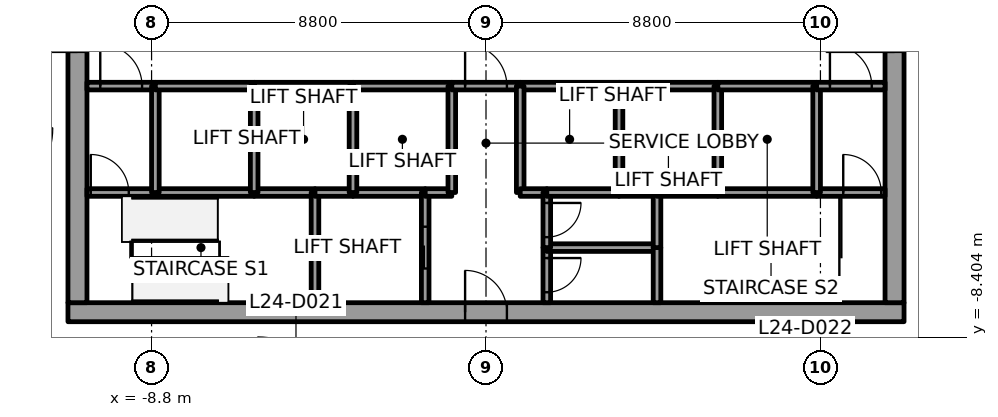
"""IFC4 building model, lengths in metres.
Left out: names, types, materials, properties, quantities, classifications, styles, units other than length and angle.
Written with IfcOpenShell. Run it as: python <this file> out.ifc"""

import sys

from ifc_helpers import new_model, si_unit, direction, frame, frame_2d, origin, place, context, subcontext, project, spatial, rectangle, extrude, element, fill, save


model = new_model("IFC4")
c1 = context("Model", 3, precision=1e-05, world=origin(), true_north=direction((0.0, 1.0)))
c2 = subcontext(c1, "Body", "Model", "MODEL_VIEW")
j1 = project(units=[si_unit("LENGTHUNIT", "METRE"), si_unit("PLANEANGLEUNIT", "RADIAN")], contexts=[c1])
p1 = place(None, origin())
s1 = spatial("IfcSite", under=j1, at=p1, CompositionType="ELEMENT")
p2 = place(p1, origin())
s2 = spatial("IfcBuilding", under=s1, at=p2, CompositionType="ELEMENT")
p3 = place(p2, frame((0.0, 0.0, 112.6)))
s3 = spatial("IfcBuildingStorey", under=s2, at=p3, CompositionType="ELEMENT", Elevation=112.6)
p4 = place(p3, frame((-11.0, -7.75, 0.0), z_axis=(0.0, 0.0, 1.0), x_axis=(1.0, 0.0, 0.0)))
e1 = element("IfcWall", 1, at=p4, inside=s3, PredefinedType="SHEAR", context=c2, shape_type="SweptSolid", body=[
    extrude(rectangle(XDim=22.0, YDim=0.5, at=frame_2d((11.0, 0.0))), origin(), (0.0, 0.0, 1.0), 6.0),
])
p5 = place(p4, frame((10.45, 0.0, 0.0)))
e2 = element("IfcOpeningElement", 2, at=p5, cuts=e1, PredefinedType="OPENING", context=c2, shape_type="SweptSolid", body=[
    extrude(rectangle(XDim=1.1, YDim=2.1, at=frame_2d((0.55, 1.05))), frame((0.0, 0.25, 0.0), z_axis=(0.0, -1.0, 0.0), x_axis=(1.0, 0.0, 0.0)), (0.0, 0.0, 1.0), 0.5),
])
p6 = place(p3, frame((-10.75, -7.5, 0.0), z_axis=(0.0, 0.0, 1.0), x_axis=(0.0, 1.0, 0.0)))
e3 = element("IfcWall", 3, at=p6, inside=s3, PredefinedType="SHEAR", context=c2, shape_type="SweptSolid", body=[
    extrude(rectangle(XDim=15.0, YDim=0.5, at=frame_2d((7.5, 0.0))), origin(), (0.0, 0.0, 1.0), 6.0),
])
p7 = place(p6, frame((6.6, 0.0, 0.0)))
e4 = element("IfcOpeningElement", 4, at=p7, cuts=e3, PredefinedType="OPENING", context=c2, shape_type="SweptSolid", body=[
    extrude(rectangle(XDim=1.8, YDim=2.1, at=frame_2d((0.9, 1.05))), frame((0.0, 0.25, 0.0), z_axis=(0.0, -1.0, 0.0), x_axis=(1.0, 0.0, 0.0)), (0.0, 0.0, 1.0), 0.5),
])
p8 = place(p3, frame((10.75, -7.5, 0.0), z_axis=(0.0, 0.0, 1.0), x_axis=(0.0, 1.0, 0.0)))
e5 = element("IfcWall", 5, at=p8, inside=s3, PredefinedType="SHEAR", context=c2, shape_type="SweptSolid", body=[
    extrude(rectangle(XDim=15.0, YDim=0.5, at=frame_2d((7.5, 0.0))), origin(), (0.0, 0.0, 1.0), 6.0),
])
p9 = place(p8, frame((6.6, 0.0, 0.0)))
e6 = element("IfcOpeningElement", 6, at=p9, cuts=e5, PredefinedType="OPENING", context=c2, shape_type="SweptSolid", body=[
    extrude(rectangle(XDim=1.8, YDim=2.1, at=frame_2d((0.9, 1.05))), frame((0.0, 0.25, 0.0), z_axis=(0.0, -1.0, 0.0), x_axis=(1.0, 0.0, 0.0)), (0.0, 0.0, 1.0), 0.5),
])
p10 = place(p3, frame((-10.5, -4.6, 0.0), z_axis=(0.0, 0.0, 1.0), x_axis=(1.0, 0.0, 0.0)))
e7 = element("IfcWall", 7, at=p10, inside=s3, PredefinedType="SOLIDWALL", context=c2, shape_type="SweptSolid", body=[
    extrude(rectangle(XDim=1.8, YDim=0.2, at=frame_2d((0.9, 0.0))), origin(), (0.0, 0.0, 1.0), 5.85),
])
p11 = place(p10, frame((0.1, 0.0, 0.0)))
e8 = element("IfcOpeningElement", 8, at=p11, cuts=e7, PredefinedType="OPENING", context=c2, shape_type="SweptSolid", body=[
    extrude(rectangle(XDim=1.0, YDim=2.1, at=frame_2d((0.5, 1.05))), frame((0.0, 0.1, 0.0), z_axis=(0.0, -1.0, 0.0), x_axis=(1.0, 0.0, 0.0)), (0.0, 0.0, 1.0), 0.2),
])
p12 = place(p3, frame((-10.5, -1.8, 0.0), z_axis=(0.0, 0.0, 1.0), x_axis=(1.0, 0.0, 0.0)))
e9 = element("IfcWall", 9, at=p12, inside=s3, PredefinedType="SOLIDWALL", context=c2, shape_type="SweptSolid", body=[
    extrude(rectangle(XDim=1.8, YDim=0.2, at=frame_2d((0.9, 0.0))), origin(), (0.0, 0.0, 1.0), 5.85),
])
p13 = place(p12, frame((0.35, 0.0, 0.0)))
e10 = element("IfcOpeningElement", 10, at=p13, cuts=e9, PredefinedType="OPENING", context=c2, shape_type="SweptSolid", body=[
    extrude(rectangle(XDim=1.1, YDim=2.1, at=frame_2d((0.55, 1.05))), frame((0.0, 0.1, 0.0), z_axis=(0.0, -1.0, 0.0), x_axis=(1.0, 0.0, 0.0)), (0.0, 0.0, 1.0), 0.2),
])
p14 = place(p3, frame((-8.7, -4.6, 0.0), z_axis=(0.0, 0.0, 1.0), x_axis=(1.0, 0.0, 0.0)))
e11 = element("IfcWall", 11, at=p14, inside=s3, PredefinedType="SOLIDWALL", context=c2, shape_type="SweptSolid", body=[
    extrude(rectangle(XDim=2.6, YDim=0.2, at=frame_2d((1.3, 0.0))), origin(), (0.0, 0.0, 1.0), 5.85),
])
p15 = place(p3, frame((-8.7, -4.6, 0.0), z_axis=(0.0, 0.0, 1.0), x_axis=(0.0, 1.0, 0.0)))
e12 = element("IfcWall", 12, at=p15, inside=s3, PredefinedType="SOLIDWALL", context=c2, shape_type="SweptSolid", body=[
    extrude(rectangle(XDim=2.8, YDim=0.2, at=frame_2d((1.4, 0.0))), origin(), (0.0, 0.0, 1.0), 5.85),
])
p16 = place(p3, frame((-8.7, -1.8, 0.0), z_axis=(0.0, 0.0, 1.0), x_axis=(1.0, 0.0, 0.0)))
e13 = element("IfcWall", 13, at=p16, inside=s3, PredefinedType="SOLIDWALL", context=c2, shape_type="SweptSolid", body=[
    extrude(rectangle(XDim=2.6, YDim=0.2, at=frame_2d((1.3, 0.0))), origin(), (0.0, 0.0, 1.0), 5.85),
])
p17 = place(p3, frame((-6.1, -4.6, 0.0), z_axis=(0.0, 0.0, 1.0), x_axis=(1.0, 0.0, 0.0)))
e14 = element("IfcWall", 14, at=p17, inside=s3, PredefinedType="SOLIDWALL", context=c2, shape_type="SweptSolid", body=[
    extrude(rectangle(XDim=1.6, YDim=0.2, at=frame_2d((0.8, 0.0))), origin(), (0.0, 0.0, 1.0), 5.85),
])
p18 = place(p3, frame((-6.1, -4.6, 0.0), z_axis=(0.0, 0.0, 1.0), x_axis=(0.0, 1.0, 0.0)))
e15 = element("IfcWall", 15, at=p18, inside=s3, PredefinedType="SOLIDWALL", context=c2, shape_type="SweptSolid", body=[
    extrude(rectangle(XDim=2.8, YDim=0.2, at=frame_2d((1.4, 0.0))), origin(), (0.0, 0.0, 1.0), 5.85),
])
p19 = place(p3, frame((-6.1, -1.8, 0.0), z_axis=(0.0, 0.0, 1.0), x_axis=(1.0, 0.0, 0.0)))
e16 = element("IfcWall", 16, at=p19, inside=s3, PredefinedType="SOLIDWALL", context=c2, shape_type="SweptSolid", body=[
    extrude(rectangle(XDim=2.6, YDim=0.2, at=frame_2d((1.3, 0.0))), origin(), (0.0, 0.0, 1.0), 5.85),
])
p20 = place(p3, frame((-4.5, -4.6, 0.0), z_axis=(0.0, 0.0, 1.0), x_axis=(0.0, -1.0, 0.0)))
e17 = element("IfcWall", 17, at=p20, inside=s3, PredefinedType="SOLIDWALL", context=c2, shape_type="SweptSolid", body=[
    extrude(rectangle(XDim=2.9, YDim=0.2, at=frame_2d((1.45, 0.0))), origin(), (0.0, 0.0, 1.0), 5.85),
])
p21 = place(p3, frame((-4.5, -4.6, 0.0), z_axis=(0.0, 0.0, 1.0), x_axis=(1.0, 0.0, 0.0)))
e18 = element("IfcWall", 18, at=p21, inside=s3, PredefinedType="SOLIDWALL", context=c2, shape_type="SweptSolid", body=[
    extrude(rectangle(XDim=1.0, YDim=0.2, at=frame_2d((0.5, 0.0))), origin(), (0.0, 0.0, 1.0), 5.85),
])
p22 = place(p3, frame((-3.5, -4.6, 0.0), z_axis=(0.0, 0.0, 1.0), x_axis=(1.0, 0.0, 0.0)))
e19 = element("IfcWall", 19, at=p22, inside=s3, PredefinedType="SOLIDWALL", context=c2, shape_type="SweptSolid", body=[
    extrude(rectangle(XDim=1.9, YDim=0.2, at=frame_2d((0.95, 0.0))), origin(), (0.0, 0.0, 1.0), 5.85),
])
p23 = place(p3, frame((-3.5, -4.6, 0.0), z_axis=(0.0, 0.0, 1.0), x_axis=(0.0, 1.0, 0.0)))
e20 = element("IfcWall", 20, at=p23, inside=s3, PredefinedType="SOLIDWALL", context=c2, shape_type="SweptSolid", body=[
    extrude(rectangle(XDim=2.8, YDim=0.2, at=frame_2d((1.4, 0.0))), origin(), (0.0, 0.0, 1.0), 5.85),
])
p24 = place(p3, frame((-3.5, -1.8, 0.0), z_axis=(0.0, 0.0, 1.0), x_axis=(1.0, 0.0, 0.0)))
e21 = element("IfcWall", 21, at=p24, inside=s3, PredefinedType="SOLIDWALL", context=c2, shape_type="SweptSolid", body=[
    extrude(rectangle(XDim=2.6, YDim=0.2, at=frame_2d((1.3, 0.0))), origin(), (0.0, 0.0, 1.0), 5.85),
])
p25 = place(p3, frame((-1.6, -7.5, 0.0), z_axis=(0.0, 0.0, 1.0), x_axis=(0.0, 1.0, 0.0)))
e22 = element("IfcWall", 22, at=p25, inside=s3, PredefinedType="SOLIDWALL", context=c2, shape_type="SweptSolid", body=[
    extrude(rectangle(XDim=2.9, YDim=0.2, at=frame_2d((1.45, 0.0))), origin(), (0.0, 0.0, 1.0), 5.85),
])
p26 = place(p25, frame((0.9, 0.0, 0.0)))
e23 = element("IfcOpeningElement", 23, at=p26, cuts=e22, PredefinedType="OPENING", context=c2, shape_type="SweptSolid", body=[
    extrude(rectangle(XDim=1.1, YDim=2.1, at=frame_2d((0.55, 1.05))), frame((0.0, 0.1, 0.0), z_axis=(0.0, -1.0, 0.0), x_axis=(1.0, 0.0, 0.0)), (0.0, 0.0, 1.0), 0.2),
])
p27 = place(p3, frame((-1.6, -4.6, 0.0), z_axis=(0.0, 0.0, 1.0), x_axis=(1.0, 0.0, 0.0)))
e24 = element("IfcWall", 24, at=p27, inside=s3, PredefinedType="SOLIDWALL", context=c2, shape_type="SweptSolid", body=[
    extrude(rectangle(XDim=0.7, YDim=0.2, at=frame_2d((0.35, 0.0))), origin(), (0.0, 0.0, 1.0), 5.85),
])
p28 = place(p3, frame((-0.9, -4.6, 0.0), z_axis=(0.0, 0.0, 1.0), x_axis=(0.0, 1.0, 0.0)))
e25 = element("IfcWall", 25, at=p28, inside=s3, PredefinedType="SOLIDWALL", context=c2, shape_type="SweptSolid", body=[
    extrude(rectangle(XDim=2.8, YDim=0.2, at=frame_2d((1.4, 0.0))), origin(), (0.0, 0.0, 1.0), 5.85),
])
p29 = place(p3, frame((-0.9, -1.8, 0.0), z_axis=(0.0, 0.0, 1.0), x_axis=(1.0, 0.0, 0.0)))
e26 = element("IfcWall", 26, at=p29, inside=s3, PredefinedType="SOLIDWALL", context=c2, shape_type="SweptSolid", body=[
    extrude(rectangle(XDim=1.8, YDim=0.2, at=frame_2d((0.9, 0.0))), origin(), (0.0, 0.0, 1.0), 5.85),
])
p30 = place(p29, frame((0.35, 0.0, 0.0)))
e27 = element("IfcOpeningElement", 27, at=p30, cuts=e26, PredefinedType="OPENING", context=c2, shape_type="SweptSolid", body=[
    extrude(rectangle(XDim=1.1, YDim=2.1, at=frame_2d((0.55, 1.05))), frame((0.0, 0.1, 0.0), z_axis=(0.0, -1.0, 0.0), x_axis=(1.0, 0.0, 0.0)), (0.0, 0.0, 1.0), 0.2),
])
p31 = place(p3, frame((0.9, -1.8, 0.0), z_axis=(0.0, 0.0, 1.0), x_axis=(1.0, 0.0, 0.0)))
e28 = element("IfcWall", 28, at=p31, inside=s3, PredefinedType="SOLIDWALL", context=c2, shape_type="SweptSolid", body=[
    extrude(rectangle(XDim=2.6, YDim=0.2, at=frame_2d((1.3, 0.0))), origin(), (0.0, 0.0, 1.0), 5.85),
])
p32 = place(p3, frame((0.9, -1.8, 0.0), z_axis=(0.0, 0.0, 1.0), x_axis=(0.0, -1.0, 0.0)))
e29 = element("IfcWall", 29, at=p32, inside=s3, PredefinedType="SOLIDWALL", context=c2, shape_type="SweptSolid", body=[
    extrude(rectangle(XDim=2.8, YDim=0.2, at=frame_2d((1.4, 0.0))), origin(), (0.0, 0.0, 1.0), 5.85),
])
p33 = place(p3, frame((0.9, -4.6, 0.0), z_axis=(0.0, 0.0, 1.0), x_axis=(1.0, 0.0, 0.0)))
e30 = element("IfcWall", 30, at=p33, inside=s3, PredefinedType="SOLIDWALL", context=c2, shape_type="SweptSolid", body=[
    extrude(rectangle(XDim=0.7, YDim=0.2, at=frame_2d((0.35, 0.0))), origin(), (0.0, 0.0, 1.0), 5.85),
])
p34 = place(p3, frame((1.6, -6.05, 0.0), z_axis=(0.0, 0.0, 1.0), x_axis=(0.0, -1.0, 0.0)))
e31 = element("IfcWall", 31, at=p34, inside=s3, PredefinedType="SOLIDWALL", context=c2, shape_type="SweptSolid", body=[
    extrude(rectangle(XDim=1.45, YDim=0.2, at=frame_2d((0.725, 0.0))), origin(), (0.0, 0.0, 1.0), 5.85),
])
p35 = place(p34, frame((0.275, 0.0, 0.0)))
e32 = element("IfcOpeningElement", 32, at=p35, cuts=e31, PredefinedType="OPENING", context=c2, shape_type="SweptSolid", body=[
    extrude(rectangle(XDim=0.9, YDim=2.1, at=frame_2d((0.45, 1.05))), frame((0.0, 0.1, 0.0), z_axis=(0.0, -1.0, 0.0), x_axis=(1.0, 0.0, 0.0)), (0.0, 0.0, 1.0), 0.2),
])
p36 = place(p3, frame((4.5, -6.05, 0.0), z_axis=(0.0, 0.0, 1.0), x_axis=(-1.0, 0.0, 0.0)))
e33 = element("IfcWall", 33, at=p36, inside=s3, PredefinedType="SOLIDWALL", context=c2, shape_type="SweptSolid", body=[
    extrude(rectangle(XDim=2.9, YDim=0.2, at=frame_2d((1.45, 0.0))), origin(), (0.0, 0.0, 1.0), 5.85),
])
p37 = place(p3, frame((1.6, -4.6, 0.0), z_axis=(0.0, 0.0, 1.0), x_axis=(0.0, -1.0, 0.0)))
e34 = element("IfcWall", 34, at=p37, inside=s3, PredefinedType="SOLIDWALL", context=c2, shape_type="SweptSolid", body=[
    extrude(rectangle(XDim=1.45, YDim=0.2, at=frame_2d((0.725, 0.0))), origin(), (0.0, 0.0, 1.0), 5.85),
])
p38 = place(p37, frame((0.275, 0.0, 0.0)))
e35 = element("IfcOpeningElement", 35, at=p38, cuts=e34, PredefinedType="OPENING", context=c2, shape_type="SweptSolid", body=[
    extrude(rectangle(XDim=0.9, YDim=2.1, at=frame_2d((0.45, 1.05))), frame((0.0, 0.1, 0.0), z_axis=(0.0, -1.0, 0.0), x_axis=(1.0, 0.0, 0.0)), (0.0, 0.0, 1.0), 0.2),
])
p39 = place(p3, frame((3.5, -4.6, 0.0), z_axis=(0.0, 0.0, 1.0), x_axis=(-1.0, 0.0, 0.0)))
e36 = element("IfcWall", 36, at=p39, inside=s3, PredefinedType="SOLIDWALL", context=c2, shape_type="SweptSolid", body=[
    extrude(rectangle(XDim=1.9, YDim=0.2, at=frame_2d((0.95, 0.0))), origin(), (0.0, 0.0, 1.0), 5.85),
])
p40 = place(p3, frame((4.5, -4.6, 0.0), z_axis=(0.0, 0.0, 1.0), x_axis=(-1.0, 0.0, 0.0)))
e37 = element("IfcWall", 37, at=p40, inside=s3, PredefinedType="SOLIDWALL", context=c2, shape_type="SweptSolid", body=[
    extrude(rectangle(XDim=1.0, YDim=0.2, at=frame_2d((0.5, 0.0))), origin(), (0.0, 0.0, 1.0), 5.85),
])
p41 = place(p3, frame((3.5, -4.6, 0.0), z_axis=(0.0, 0.0, 1.0), x_axis=(0.0, 1.0, 0.0)))
e38 = element("IfcWall", 38, at=p41, inside=s3, PredefinedType="SOLIDWALL", context=c2, shape_type="SweptSolid", body=[
    extrude(rectangle(XDim=2.8, YDim=0.2, at=frame_2d((1.4, 0.0))), origin(), (0.0, 0.0, 1.0), 5.85),
])
p42 = place(p3, frame((3.5, -1.8, 0.0), z_axis=(0.0, 0.0, 1.0), x_axis=(1.0, 0.0, 0.0)))
e39 = element("IfcWall", 39, at=p42, inside=s3, PredefinedType="SOLIDWALL", context=c2, shape_type="SweptSolid", body=[
    extrude(rectangle(XDim=2.6, YDim=0.2, at=frame_2d((1.3, 0.0))), origin(), (0.0, 0.0, 1.0), 5.85),
])
for number, where, z_axis, x_axis in (
    (40, (4.5, -7.5, 0.0), (0.0, 0.0, 1.0), (0.0, 1.0, 0.0)),
    (41, (4.5, -6.05, 0.0), (0.0, 0.0, 1.0), (0.0, 1.0, 0.0)),
):
    element("IfcWall", number, at=place(p3, frame(where, z_axis=z_axis, x_axis=x_axis)), inside=s3, PredefinedType="SOLIDWALL", context=c2, shape_type="SweptSolid", body=[
        extrude(rectangle(XDim=1.45, YDim=0.2, at=frame_2d((0.725, 0.0))), origin(), (0.0, 0.0, 1.0), 5.85),
    ])
p43 = place(p3, frame((4.5, -4.6, 0.0), z_axis=(0.0, 0.0, 1.0), x_axis=(1.0, 0.0, 0.0)))
e42 = element("IfcWall", 42, at=p43, inside=s3, PredefinedType="SOLIDWALL", context=c2, shape_type="SweptSolid", body=[
    extrude(rectangle(XDim=1.6, YDim=0.2, at=frame_2d((0.8, 0.0))), origin(), (0.0, 0.0, 1.0), 5.85),
])
p44 = place(p3, frame((6.1, -4.6, 0.0), z_axis=(0.0, 0.0, 1.0), x_axis=(1.0, 0.0, 0.0)))
e43 = element("IfcWall", 43, at=p44, inside=s3, PredefinedType="SOLIDWALL", context=c2, shape_type="SweptSolid", body=[
    extrude(rectangle(XDim=2.6, YDim=0.2, at=frame_2d((1.3, 0.0))), origin(), (0.0, 0.0, 1.0), 5.85),
])
p45 = place(p3, frame((6.1, -4.6, 0.0), z_axis=(0.0, 0.0, 1.0), x_axis=(0.0, 1.0, 0.0)))
e44 = element("IfcWall", 44, at=p45, inside=s3, PredefinedType="SOLIDWALL", context=c2, shape_type="SweptSolid", body=[
    extrude(rectangle(XDim=2.8, YDim=0.2, at=frame_2d((1.4, 0.0))), origin(), (0.0, 0.0, 1.0), 5.85),
])
p46 = place(p3, frame((6.1, -1.8, 0.0), z_axis=(0.0, 0.0, 1.0), x_axis=(1.0, 0.0, 0.0)))
e45 = element("IfcWall", 45, at=p46, inside=s3, PredefinedType="SOLIDWALL", context=c2, shape_type="SweptSolid", body=[
    extrude(rectangle(XDim=2.6, YDim=0.2, at=frame_2d((1.3, 0.0))), origin(), (0.0, 0.0, 1.0), 5.85),
])
p47 = place(p3, frame((8.7, -4.6, 0.0), z_axis=(0.0, 0.0, 1.0), x_axis=(1.0, 0.0, 0.0)))
e46 = element("IfcWall", 46, at=p47, inside=s3, PredefinedType="SOLIDWALL", context=c2, shape_type="SweptSolid", body=[
    extrude(rectangle(XDim=1.8, YDim=0.2, at=frame_2d((0.9, 0.0))), origin(), (0.0, 0.0, 1.0), 5.85),
])
p48 = place(p47, frame((0.7, 0.0, 0.0)))
e47 = element("IfcOpeningElement", 47, at=p48, cuts=e46, PredefinedType="OPENING", context=c2, shape_type="SweptSolid", body=[
    extrude(rectangle(XDim=1.0, YDim=2.1, at=frame_2d((0.5, 1.05))), frame((0.0, 0.1, 0.0), z_axis=(0.0, -1.0, 0.0), x_axis=(1.0, 0.0, 0.0)), (0.0, 0.0, 1.0), 0.2),
])
p49 = place(p3, frame((8.7, -1.8, 0.0), z_axis=(0.0, 0.0, 1.0), x_axis=(0.0, -1.0, 0.0)))
e48 = element("IfcWall", 48, at=p49, inside=s3, PredefinedType="SOLIDWALL", context=c2, shape_type="SweptSolid", body=[
    extrude(rectangle(XDim=2.8, YDim=0.2, at=frame_2d((1.4, 0.0))), origin(), (0.0, 0.0, 1.0), 5.85),
])
p50 = place(p3, frame((8.7, -1.8, 0.0), z_axis=(0.0, 0.0, 1.0), x_axis=(1.0, 0.0, 0.0)))
e49 = element("IfcWall", 49, at=p50, inside=s3, PredefinedType="SOLIDWALL", context=c2, shape_type="SweptSolid", body=[
    extrude(rectangle(XDim=1.8, YDim=0.2, at=frame_2d((0.9, 0.0))), origin(), (0.0, 0.0, 1.0), 5.85),
])
p51 = place(p50, frame((0.35, 0.0, 0.0)))
e50 = element("IfcOpeningElement", 50, at=p51, cuts=e49, PredefinedType="OPENING", context=c2, shape_type="SweptSolid", body=[
    extrude(rectangle(XDim=1.1, YDim=2.1, at=frame_2d((0.55, 1.05))), frame((0.0, 0.1, 0.0), z_axis=(0.0, -1.0, 0.0), x_axis=(1.0, 0.0, 0.0)), (0.0, 0.0, 1.0), 0.2),
])
p52 = place(p26, origin())
e51 = element("IfcDoor", 51, at=p52, inside=s3, OperationType="SLIDING_TO_LEFT", PredefinedType="DOOR", context=c2, shape_type="SweptSolid", body=[
    extrude(rectangle(XDim=1.1, YDim=2.1, at=frame_2d((0.55, 1.05))), frame((0.0, 0.025, 0.0), z_axis=(0.0, -1.0, 0.0), x_axis=(1.0, 0.0, 0.0)), (0.0, 0.0, 1.0), 0.05),
])
fill(e23, e51)
p53 = place(p13, origin())
e52 = element("IfcDoor", 52, at=p53, inside=s3, OperationType="SINGLE_SWING_RIGHT", PredefinedType="DOOR", context=c2, shape_type="SweptSolid", body=[
    extrude(rectangle(XDim=1.1, YDim=2.1, at=frame_2d((0.55, 1.05))), frame((0.0, 0.025, 0.0), z_axis=(0.0, -1.0, 0.0), x_axis=(1.0, 0.0, 0.0)), (0.0, 0.0, 1.0), 0.05),
])
fill(e10, e52)
p54 = place(p51, origin())
e53 = element("IfcDoor", 53, at=p54, inside=s3, OperationType="SINGLE_SWING_LEFT", PredefinedType="DOOR", context=c2, shape_type="SweptSolid", body=[
    extrude(rectangle(XDim=1.1, YDim=2.1, at=frame_2d((0.55, 1.05))), frame((0.0, 0.025, 0.0), z_axis=(0.0, -1.0, 0.0), x_axis=(1.0, 0.0, 0.0)), (0.0, 0.0, 1.0), 0.05),
])
fill(e50, e53)
p55 = place(p30, origin())
e54 = element("IfcDoor", 54, at=p55, inside=s3, OperationType="SINGLE_SWING_LEFT", PredefinedType="DOOR", context=c2, shape_type="SweptSolid", body=[
    extrude(rectangle(XDim=1.1, YDim=2.1, at=frame_2d((0.55, 1.05))), frame((0.0, 0.025, 0.0), z_axis=(0.0, -1.0, 0.0), x_axis=(1.0, 0.0, 0.0)), (0.0, 0.0, 1.0), 0.05),
])
fill(e27, e54)
p56 = place(p11, origin())
e55 = element("IfcDoor", 55, at=p56, inside=s3, OperationType="SINGLE_SWING_LEFT", PredefinedType="DOOR", context=c2, shape_type="SweptSolid", body=[
    extrude(rectangle(XDim=1.0, YDim=2.1, at=frame_2d((0.5, 1.05))), frame((0.0, 0.025, 0.0), z_axis=(0.0, -1.0, 0.0), x_axis=(1.0, 0.0, 0.0)), (0.0, 0.0, 1.0), 0.05),
])
fill(e8, e55)
p57 = place(p48, origin())
e56 = element("IfcDoor", 56, at=p57, inside=s3, OperationType="SINGLE_SWING_RIGHT", PredefinedType="DOOR", context=c2, shape_type="SweptSolid", body=[
    extrude(rectangle(XDim=1.0, YDim=2.1, at=frame_2d((0.5, 1.05))), frame((0.0, 0.025, 0.0), z_axis=(0.0, -1.0, 0.0), x_axis=(1.0, 0.0, 0.0)), (0.0, 0.0, 1.0), 0.05),
])
fill(e47, e56)
p58 = place(p35, origin())
e57 = element("IfcDoor", 57, at=p58, inside=s3, OperationType="SINGLE_SWING_LEFT", PredefinedType="DOOR", context=c2, shape_type="SweptSolid", body=[
    extrude(rectangle(XDim=0.9, YDim=2.1, at=frame_2d((0.45, 1.05))), frame((0.0, 0.025, 0.0), z_axis=(0.0, -1.0, 0.0), x_axis=(1.0, 0.0, 0.0)), (0.0, 0.0, 1.0), 0.05),
])
fill(e32, e57)
p59 = place(p38, origin())
e58 = element("IfcDoor", 58, at=p59, inside=s3, OperationType="SINGLE_SWING_RIGHT", PredefinedType="DOOR", context=c2, shape_type="SweptSolid", body=[
    extrude(rectangle(XDim=0.9, YDim=2.1, at=frame_2d((0.45, 1.05))), frame((0.0, 0.025, 0.0), z_axis=(0.0, -1.0, 0.0), x_axis=(1.0, 0.0, 0.0)), (0.0, 0.0, 1.0), 0.05),
])
fill(e35, e58)
p60 = place(p7, origin())
e59 = element("IfcDoor", 59, at=p60, inside=s3, OperationType="DOUBLE_DOOR_SINGLE_SWING", PredefinedType="DOOR", context=c2, shape_type="SweptSolid", body=[
    extrude(rectangle(XDim=1.8, YDim=2.1, at=frame_2d((0.9, 1.05))), frame((0.0, 0.025, 0.0), z_axis=(0.0, -1.0, 0.0), x_axis=(1.0, 0.0, 0.0)), (0.0, 0.0, 1.0), 0.05),
])
fill(e4, e59)
p61 = place(p9, origin())
e60 = element("IfcDoor", 60, at=p61, inside=s3, OperationType="DOUBLE_DOOR_SINGLE_SWING", PredefinedType="DOOR", context=c2, shape_type="SweptSolid", body=[
    extrude(rectangle(XDim=1.8, YDim=2.1, at=frame_2d((0.9, 1.05))), frame((0.0, 0.025, 0.0), z_axis=(0.0, -1.0, 0.0), x_axis=(1.0, 0.0, 0.0)), (0.0, 0.0, 1.0), 0.05),
])
fill(e6, e60)
p62 = place(p5, origin())
e61 = element("IfcDoor", 61, at=p62, inside=s3, OperationType="SINGLE_SWING_RIGHT", PredefinedType="DOOR", context=c2, shape_type="SweptSolid", body=[
    extrude(rectangle(XDim=1.1, YDim=2.1, at=frame_2d((0.55, 1.05))), frame((0.0, 0.025, 0.0), z_axis=(0.0, -1.0, 0.0), x_axis=(1.0, 0.0, 0.0)), (0.0, 0.0, 1.0), 0.05),
])
fill(e2, e61)
save(model, sys.argv[1])
